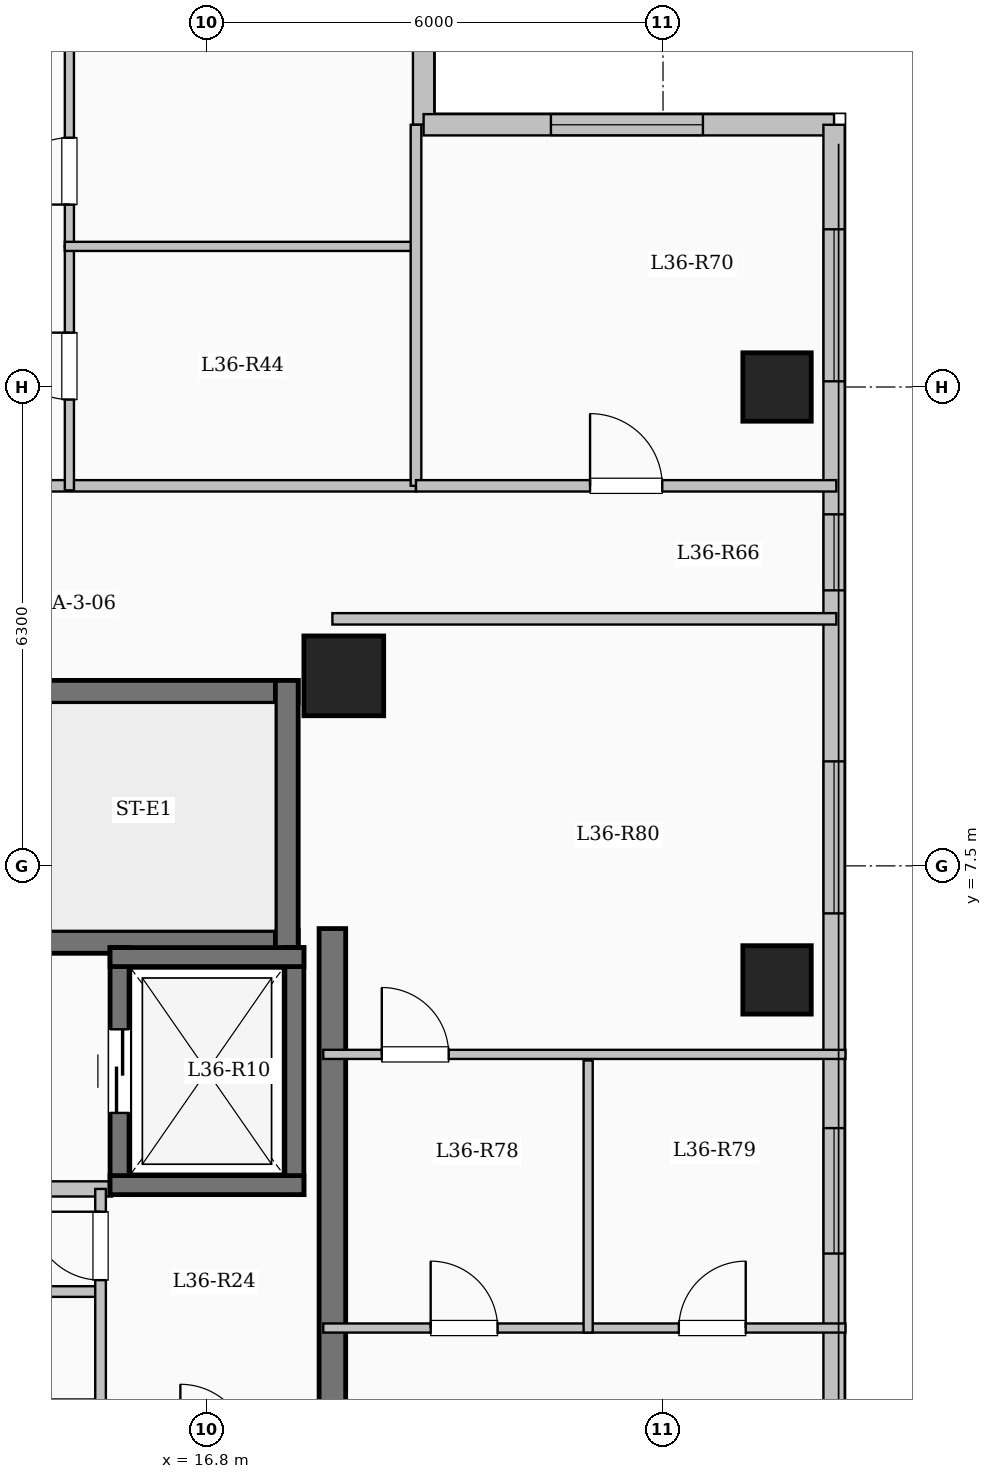
"""IFC4 building model, lengths in metres.
Left out: names, types, materials, properties, quantities, classifications, styles, units other than length and angle.
Written with IfcOpenShell. Run it as: python <this file> out.ifc"""

import sys

from ifc_helpers import new_model, si_unit, direction, frame, frame_2d, origin, origin_2d, place, context, subcontext, project, spatial, rectangle, extrude, element, fill, save


model = new_model("IFC4")
c1 = context("Model", 3, precision=1e-05, world=origin(), true_north=direction((0.0, 1.0)))
c2 = subcontext(c1, "Body", "Model", "MODEL_VIEW")
j1 = project(units=[si_unit("LENGTHUNIT", "METRE"), si_unit("PLANEANGLEUNIT", "RADIAN")], contexts=[c1])
p1 = place(None, origin())
s1 = spatial("IfcSite", under=j1, at=p1, CompositionType="ELEMENT")
p2 = place(p1, origin())
s2 = spatial("IfcBuilding", under=s1, at=p2, CompositionType="ELEMENT")
p3 = place(p2, frame((0.0, 0.0, 135.95)))
s3 = spatial("IfcBuildingStorey", under=s2, at=p3, CompositionType="ELEMENT", Elevation=135.95)
p4 = place(p3, frame((18.6, 10.0, 0.0), z_axis=(0.0, 0.0, 1.0), x_axis=(1.0, 0.0, 0.0)))
e1 = element("IfcColumn", 1, at=p4, inside=s3, PredefinedType="COLUMN", context=c2, shape_type="SweptSolid", body=[
    extrude(rectangle(XDim=1.05, YDim=1.05, at=origin_2d()), origin(), (0.0, 0.0, 1.0), 3.35),
])
for number, where, z_axis, x_axis in (
    (2, (24.3, 6.0, 0.0), (0.0, 0.0, 1.0), (1.0, 0.0, 0.0)),
    (3, (24.3, 13.8, 0.0), (0.0, 0.0, 1.0), (1.0, 0.0, 0.0)),
):
    element("IfcColumn", number, at=place(p3, frame(where, z_axis=z_axis, x_axis=x_axis)), inside=s3, PredefinedType="COLUMN", context=c2, shape_type="SweptSolid", body=[
        extrude(rectangle(XDim=0.9, YDim=0.9, at=origin_2d()), origin(), (0.0, 0.0, 1.0), 3.35),
    ])
p5 = place(p3, frame((19.65, 21.15, 0.0), z_axis=(0.0, 0.0, 1.0), x_axis=(0.0, -1.0, 0.0)))
e4 = element("IfcWall", 4, at=p5, inside=s3, PredefinedType="SOLIDWALL", context=c2, shape_type="SweptSolid", body=[
    extrude(rectangle(XDim=3.9, YDim=0.28, at=frame_2d((1.95, 0.0))), origin(), (0.0, 0.0, 1.0), 3.1),
])
p6 = place(p5, frame((1.143, 0.0, 0.9)))
e5 = element("IfcOpeningElement", 5, at=p6, cuts=e4, PredefinedType="OPENING", context=c2, shape_type="SweptSolid", body=[
    extrude(rectangle(XDim=1.65, YDim=1.6, at=frame_2d((0.825, 0.8))), frame((0.0, 0.15, 0.0), z_axis=(0.0, -1.0, 0.0), x_axis=(1.0, 0.0, 0.0)), (0.0, 0.0, 1.0), 0.3),
])
p7 = place(p3, frame((19.65, 17.25, 0.0), z_axis=(0.0, 0.0, 1.0), x_axis=(1.0, 0.0, 0.0)))
e6 = element("IfcWall", 6, at=p7, inside=s3, PredefinedType="SOLIDWALL", context=c2, shape_type="SweptSolid", body=[
    extrude(rectangle(XDim=5.4, YDim=0.28, at=frame_2d((2.7, 0.0))), origin(), (0.0, 0.0, 1.0), 3.1),
])
p8 = place(p7, frame((1.675, 0.0, 0.9)))
e7 = element("IfcOpeningElement", 7, at=p8, cuts=e6, PredefinedType="OPENING", context=c2, shape_type="SweptSolid", body=[
    extrude(rectangle(XDim=2.0, YDim=1.7, at=frame_2d((1.0, 0.85))), frame((0.0, 0.15, 0.0), z_axis=(0.0, -1.0, 0.0), x_axis=(1.0, 0.0, 0.0)), (0.0, 0.0, 1.0), 0.3),
])
p9 = place(p3, frame((25.05, 17.25, 0.0), z_axis=(0.0, 0.0, 1.0), x_axis=(0.0, -1.0, 0.0)))
e8 = element("IfcWall", 8, at=p9, inside=s3, PredefinedType="SOLIDWALL", context=c2, shape_type="SweptSolid", body=[
    extrude(rectangle(XDim=34.5, YDim=0.28, at=frame_2d((17.25, 0.0))), origin(), (0.0, 0.0, 1.0), 3.1),
])
p10 = place(p9, frame((1.375, 0.0, 0.9)))
e9 = element("IfcOpeningElement", 9, at=p10, cuts=e8, PredefinedType="OPENING", context=c2, shape_type="SweptSolid", body=[
    extrude(rectangle(XDim=2.0, YDim=1.7, at=frame_2d((1.0, 0.85))), frame((0.0, 0.15, 0.0), z_axis=(0.0, -1.0, 0.0), x_axis=(1.0, 0.0, 0.0)), (0.0, 0.0, 1.0), 0.3),
])
p11 = place(p9, frame((5.125, 0.0, 0.95)))
e10 = element("IfcOpeningElement", 10, at=p11, cuts=e8, PredefinedType="OPENING", context=c2, shape_type="SweptSolid", body=[
    extrude(rectangle(XDim=1.0, YDim=1.5, at=frame_2d((0.5, 0.75))), frame((0.0, 0.15, 0.0), z_axis=(0.0, -1.0, 0.0), x_axis=(1.0, 0.0, 0.0)), (0.0, 0.0, 1.0), 0.3),
])
p12 = place(p9, frame((8.375, 0.0, 0.9)))
e11 = element("IfcOpeningElement", 11, at=p12, cuts=e8, PredefinedType="OPENING", context=c2, shape_type="SweptSolid", body=[
    extrude(rectangle(XDim=2.0, YDim=1.7, at=frame_2d((1.0, 0.85))), frame((0.0, 0.15, 0.0), z_axis=(0.0, -1.0, 0.0), x_axis=(1.0, 0.0, 0.0)), (0.0, 0.0, 1.0), 0.3),
])
p13 = place(p9, frame((13.2, 0.0, 0.9)))
e12 = element("IfcOpeningElement", 12, at=p13, cuts=e8, PredefinedType="OPENING", context=c2, shape_type="SweptSolid", body=[
    extrude(rectangle(XDim=1.65, YDim=1.6, at=frame_2d((0.825, 0.8))), frame((0.0, 0.15, 0.0), z_axis=(0.0, -1.0, 0.0), x_axis=(1.0, 0.0, 0.0)), (0.0, 0.0, 1.0), 0.3),
])
p14 = place(p9, frame((19.05, 0.0, 0.9)))
e13 = element("IfcOpeningElement", 13, at=p14, cuts=e8, PredefinedType="OPENING", context=c2, shape_type="SweptSolid", body=[
    extrude(rectangle(XDim=2.2, YDim=1.75, at=frame_2d((1.1, 0.875))), frame((0.0, 0.15, 0.0), z_axis=(0.0, -1.0, 0.0), x_axis=(1.0, 0.0, 0.0)), (0.0, 0.0, 1.0), 0.3),
])
p15 = place(p9, frame((25.258, 0.0, 0.9)))
e14 = element("IfcOpeningElement", 14, at=p15, cuts=e8, PredefinedType="OPENING", context=c2, shape_type="SweptSolid", body=[
    extrude(rectangle(XDim=1.5, YDim=1.65, at=frame_2d((0.75, 0.825))), frame((0.0, 0.15, 0.0), z_axis=(0.0, -1.0, 0.0), x_axis=(1.0, 0.0, 0.0)), (0.0, 0.0, 1.0), 0.3),
])
p16 = place(p9, frame((29.95, 0.0, 0.9)))
e15 = element("IfcOpeningElement", 15, at=p16, cuts=e8, PredefinedType="OPENING", context=c2, shape_type="SweptSolid", body=[
    extrude(rectangle(XDim=2.2, YDim=1.75, at=frame_2d((1.1, 0.875))), frame((0.0, 0.15, 0.0), z_axis=(0.0, -1.0, 0.0), x_axis=(1.0, 0.0, 0.0)), (0.0, 0.0, 1.0), 0.3),
])
p17 = place(p3, frame((10.0, 9.79, 0.0), z_axis=(0.0, 0.0, 1.0), x_axis=(1.0, 0.0, 0.0)))
e16 = element("IfcWall", 16, at=p17, inside=s3, PredefinedType="SHEAR", context=c2, shape_type="SweptSolid", body=[
    extrude(rectangle(XDim=8.0, YDim=0.3, at=frame_2d((4.0, 0.0))), origin(), (0.0, 0.0, 1.0), 3.35),
])
p18 = place(p3, frame((10.0, 6.5, 0.0), z_axis=(0.0, 0.0, 1.0), x_axis=(1.0, 0.0, 0.0)))
e17 = element("IfcWall", 17, at=p18, inside=s3, PredefinedType="SHEAR", context=c2, shape_type="SweptSolid", body=[
    extrude(rectangle(XDim=8.0, YDim=0.3, at=frame_2d((4.0, 0.0))), origin(), (0.0, 0.0, 1.0), 3.35),
])
p19 = place(p18, frame((0.55, 0.0, 0.0)))
e18 = element("IfcOpeningElement", 18, at=p19, cuts=e17, PredefinedType="OPENING", context=c2, shape_type="SweptSolid", body=[
    extrude(rectangle(XDim=1.0, YDim=2.15, at=frame_2d((0.5, 1.075))), frame((0.0, 0.16, 0.0), z_axis=(0.0, -1.0, 0.0), x_axis=(1.0, 0.0, 0.0)), (0.0, 0.0, 1.0), 0.32),
])
p20 = place(p3, frame((17.85, 6.35, 0.0), z_axis=(0.0, 0.0, 1.0), x_axis=(0.0, 1.0, 0.0)))
e19 = element("IfcWall", 19, at=p20, inside=s3, PredefinedType="SHEAR", context=c2, shape_type="SweptSolid", body=[
    extrude(rectangle(XDim=3.59, YDim=0.3, at=frame_2d((1.795, 0.0))), origin(), (0.0, 0.0, 1.0), 3.35),
])
p21 = place(p3, frame((10.15, 3.25, 0.0), z_axis=(0.0, 0.0, 1.0), x_axis=(1.0, 0.0, 0.0)))
e20 = element("IfcWall", 20, at=p21, inside=s3, PredefinedType="SOLIDWALL", context=c2, shape_type="SweptSolid", body=[
    extrude(rectangle(XDim=5.4, YDim=0.2, at=frame_2d((2.7, 0.0))), origin(), (0.0, 0.0, 1.0), 3.1),
])
p22 = place(p3, frame((15.65, 3.175, 0.0), z_axis=(0.0, 0.0, 1.0), x_axis=(0.0, 1.0, 0.0)))
e21 = element("IfcWall", 21, at=p22, inside=s3, PredefinedType="SHEAR", context=c2, shape_type="SweptSolid", body=[
    extrude(rectangle(XDim=3.25, YDim=0.25, at=frame_2d((1.625, 0.0))), origin(), (0.0, 0.0, 1.0), 3.35),
])
p23 = place(p22, frame((1.075, 0.0, 0.0)))
e22 = element("IfcOpeningElement", 22, at=p23, cuts=e21, PredefinedType="OPENING", context=c2, shape_type="SweptSolid", body=[
    extrude(rectangle(XDim=1.1, YDim=2.15, at=frame_2d((0.55, 1.075))), frame((0.0, 0.135, 0.0), z_axis=(0.0, -1.0, 0.0), x_axis=(1.0, 0.0, 0.0)), (0.0, 0.0, 1.0), 0.27),
])
p24 = place(p3, frame((17.95, 3.175, 0.0), z_axis=(0.0, 0.0, 1.0), x_axis=(0.0, 1.0, 0.0)))
e23 = element("IfcWall", 23, at=p24, inside=s3, PredefinedType="SHEAR", context=c2, shape_type="SweptSolid", body=[
    extrude(rectangle(XDim=3.25, YDim=0.25, at=frame_2d((1.625, 0.0))), origin(), (0.0, 0.0, 1.0), 3.35),
])
for number, where, z_axis, x_axis in (
    (24, (15.525, 3.3, 0.0), (0.0, 0.0, 1.0), (1.0, 0.0, 0.0)),
    (25, (15.525, 6.3, 0.0), (0.0, 0.0, 1.0), (1.0, 0.0, 0.0)),
):
    element("IfcWall", number, at=place(p3, frame(where, z_axis=z_axis, x_axis=x_axis)), inside=s3, PredefinedType="SHEAR", context=c2, shape_type="SweptSolid", body=[
        extrude(rectangle(XDim=2.55, YDim=0.25, at=frame_2d((1.275, 0.0))), origin(), (0.0, 0.0, 1.0), 3.35),
    ])
p25 = place(p3, frame((18.45, -7.375, 0.0), z_axis=(0.0, 0.0, 1.0), x_axis=(0.0, 1.0, 0.0)))
e26 = element("IfcWall", 26, at=p25, inside=s3, PredefinedType="SHEAR", context=c2, shape_type="SweptSolid", body=[
    extrude(rectangle(XDim=14.05, YDim=0.35, at=frame_2d((7.025, 0.0))), origin(), (0.0, 0.0, 1.0), 3.35),
])
p26 = place(p3, frame((12.55, 1.9, 0.0), z_axis=(0.0, 0.0, 1.0), x_axis=(1.0, 0.0, 0.0)))
e27 = element("IfcWall", 27, at=p26, inside=s3, PredefinedType="PARTITIONING", context=c2, shape_type="SweptSolid", body=[
    extrude(rectangle(XDim=2.85, YDim=0.14, at=frame_2d((1.425, 0.0))), origin(), (0.0, 0.0, 1.0), 3.1),
])
p27 = place(p3, frame((15.4, -7.2, 0.0), z_axis=(0.0, 0.0, 1.0), x_axis=(0.0, 1.0, 0.0)))
e28 = element("IfcWall", 28, at=p27, inside=s3, PredefinedType="PARTITIONING", context=c2, shape_type="SweptSolid", body=[
    extrude(rectangle(XDim=10.45, YDim=0.14, at=frame_2d((5.225, 0.0))), origin(), (0.0, 0.0, 1.0), 3.1),
])
p28 = place(p27, frame((9.25, 0.0, 0.0)))
e29 = element("IfcOpeningElement", 29, at=p28, cuts=e28, PredefinedType="OPENING", context=c2, shape_type="SweptSolid", body=[
    extrude(rectangle(XDim=0.9, YDim=2.08, at=frame_2d((0.45, 1.04))), frame((0.0, 0.08, 0.0), z_axis=(0.0, -1.0, 0.0), x_axis=(1.0, 0.0, 0.0)), (0.0, 0.0, 1.0), 0.16),
])
p29 = place(p3, frame((3.85, 12.5, 0.0), z_axis=(0.0, 0.0, 1.0), x_axis=(1.0, 0.0, 0.0)))
e30 = element("IfcWall", 30, at=p29, inside=s3, PredefinedType="PARTITIONING", context=c2, shape_type="SweptSolid", body=[
    extrude(rectangle(XDim=15.7, YDim=0.15, at=frame_2d((7.85, 0.0))), origin(), (0.0, 0.0, 1.0), 3.1),
])
p30 = place(p29, frame((0.55, 0.0, 0.0)))
e31 = element("IfcOpeningElement", 31, at=p30, cuts=e30, PredefinedType="OPENING", context=c2, shape_type="SweptSolid", body=[
    extrude(rectangle(XDim=0.96, YDim=2.15, at=frame_2d((0.48, 1.075))), frame((0.0, 0.085, 0.0), z_axis=(0.0, -1.0, 0.0), x_axis=(1.0, 0.0, 0.0)), (0.0, 0.0, 1.0), 0.17),
])
p31 = place(p29, frame((7.28, 0.0, 0.0)))
e32 = element("IfcOpeningElement", 32, at=p31, cuts=e30, PredefinedType="OPENING", context=c2, shape_type="SweptSolid", body=[
    extrude(rectangle(XDim=0.96, YDim=2.15, at=frame_2d((0.48, 1.075))), frame((0.0, 0.085, 0.0), z_axis=(0.0, -1.0, 0.0), x_axis=(1.0, 0.0, 0.0)), (0.0, 0.0, 1.0), 0.17),
])
p32 = place(p3, frame((14.99, 12.44, 0.0), z_axis=(0.0, 0.0, 1.0), x_axis=(0.0, 1.0, 0.0)))
e33 = element("IfcWall", 33, at=p32, inside=s3, PredefinedType="PARTITIONING", context=c2, shape_type="SweptSolid", body=[
    extrude(rectangle(XDim=3.21, YDim=0.12, at=frame_2d((1.605, 0.0))), origin(), (0.0, 0.0, 1.0), 2.585),
])
p33 = place(p32, frame((1.195, 0.0, 0.0)))
e34 = element("IfcOpeningElement", 34, at=p33, cuts=e33, PredefinedType="OPENING", context=c2, shape_type="SweptSolid", body=[
    extrude(rectangle(XDim=0.88, YDim=2.1, at=frame_2d((0.44, 1.05))), frame((0.0, 0.07, 0.0), z_axis=(0.0, -1.0, 0.0), x_axis=(1.0, 0.0, 0.0)), (0.0, 0.0, 1.0), 0.14),
])
p34 = place(p3, frame((14.99, 15.65, 0.0), z_axis=(0.0, 0.0, 1.0), x_axis=(0.0, 1.0, 0.0)))
e35 = element("IfcWall", 35, at=p34, inside=s3, PredefinedType="PARTITIONING", context=c2, shape_type="SweptSolid", body=[
    extrude(rectangle(XDim=5.55, YDim=0.12, at=frame_2d((2.775, 0.0))), origin(), (0.0, 0.0, 1.0), 2.585),
])
p35 = place(p34, frame((0.55, 0.0, 0.0)))
e36 = element("IfcOpeningElement", 36, at=p35, cuts=e35, PredefinedType="OPENING", context=c2, shape_type="SweptSolid", body=[
    extrude(rectangle(XDim=0.88, YDim=2.1, at=frame_2d((0.44, 1.05))), frame((0.0, 0.07, 0.0), z_axis=(0.0, -1.0, 0.0), x_axis=(1.0, 0.0, 0.0)), (0.0, 0.0, 1.0), 0.14),
])
p36 = place(p3, frame((14.93, 15.65, 0.0), z_axis=(0.0, 0.0, 1.0), x_axis=(1.0, 0.0, 0.0)))
e37 = element("IfcWall", 37, at=p36, inside=s3, PredefinedType="PARTITIONING", context=c2, shape_type="SweptSolid", body=[
    extrude(rectangle(XDim=4.68, YDim=0.12, at=frame_2d((2.34, 0.0))), origin(), (0.0, 0.0, 1.0), 3.1),
])
p37 = place(p3, frame((18.45, 10.75, 0.0), z_axis=(0.0, 0.0, 1.0), x_axis=(1.0, 0.0, 0.0)))
e38 = element("IfcWall", 38, at=p37, inside=s3, PredefinedType="PARTITIONING", context=c2, shape_type="SweptSolid", body=[
    extrude(rectangle(XDim=6.63, YDim=0.15, at=frame_2d((3.315, 0.0))), origin(), (0.0, 0.0, 1.0), 3.1),
])
p38 = place(p3, frame((19.55, 12.5, 0.0), z_axis=(0.0, 0.0, 1.0), x_axis=(0.0, 1.0, 0.0)))
e39 = element("IfcWall", 39, at=p38, inside=s3, PredefinedType="PARTITIONING", context=c2, shape_type="SweptSolid", body=[
    extrude(rectangle(XDim=4.75, YDim=0.14, at=frame_2d((2.375, 0.0))), origin(), (0.0, 0.0, 1.0), 3.1),
])
p39 = place(p3, frame((19.55, 12.5, 0.0), z_axis=(0.0, 0.0, 1.0), x_axis=(1.0, 0.0, 0.0)))
e40 = element("IfcWall", 40, at=p39, inside=s3, PredefinedType="PARTITIONING", context=c2, shape_type="SweptSolid", body=[
    extrude(rectangle(XDim=5.53, YDim=0.15, at=frame_2d((2.765, 0.0))), origin(), (0.0, 0.0, 1.0), 3.1),
])
p40 = place(p39, frame((2.29, 0.0, 0.0)))
e41 = element("IfcOpeningElement", 41, at=p40, cuts=e40, PredefinedType="OPENING", context=c2, shape_type="SweptSolid", body=[
    extrude(rectangle(XDim=0.95, YDim=2.15, at=frame_2d((0.475, 1.075))), frame((0.0, 0.085, 0.0), z_axis=(0.0, -1.0, 0.0), x_axis=(1.0, 0.0, 0.0)), (0.0, 0.0, 1.0), 0.17),
])
p41 = place(p3, frame((18.33, 1.42, 0.0), z_axis=(0.0, 0.0, 1.0), x_axis=(1.0, 0.0, 0.0)))
e42 = element("IfcWall", 42, at=p41, inside=s3, PredefinedType="PARTITIONING", context=c2, shape_type="SweptSolid", body=[
    extrude(rectangle(XDim=6.87, YDim=0.12, at=frame_2d((3.435, 0.0))), origin(), (0.0, 0.0, 1.0), 3.1),
])
p42 = place(p41, frame((1.413, 0.0, 0.0)))
e43 = element("IfcOpeningElement", 43, at=p42, cuts=e42, PredefinedType="OPENING", context=c2, shape_type="SweptSolid", body=[
    extrude(rectangle(XDim=0.88, YDim=2.1, at=frame_2d((0.44, 1.05))), frame((0.0, 0.07, 0.0), z_axis=(0.0, -1.0, 0.0), x_axis=(1.0, 0.0, 0.0)), (0.0, 0.0, 1.0), 0.14),
])
p43 = place(p41, frame((4.678, 0.0, 0.0)))
e44 = element("IfcOpeningElement", 44, at=p43, cuts=e42, PredefinedType="OPENING", context=c2, shape_type="SweptSolid", body=[
    extrude(rectangle(XDim=0.88, YDim=2.1, at=frame_2d((0.44, 1.05))), frame((0.0, 0.07, 0.0), z_axis=(0.0, -1.0, 0.0), x_axis=(1.0, 0.0, 0.0)), (0.0, 0.0, 1.0), 0.14),
])
p44 = place(p3, frame((18.33, 5.02, 0.0), z_axis=(0.0, 0.0, 1.0), x_axis=(1.0, 0.0, 0.0)))
e45 = element("IfcWall", 45, at=p44, inside=s3, PredefinedType="PARTITIONING", context=c2, shape_type="SweptSolid", body=[
    extrude(rectangle(XDim=6.87, YDim=0.12, at=frame_2d((3.435, 0.0))), origin(), (0.0, 0.0, 1.0), 3.1),
])
p45 = place(p44, frame((0.77, 0.0, 0.0)))
e46 = element("IfcOpeningElement", 46, at=p45, cuts=e45, PredefinedType="OPENING", context=c2, shape_type="SweptSolid", body=[
    extrude(rectangle(XDim=0.88, YDim=2.1, at=frame_2d((0.44, 1.05))), frame((0.0, 0.07, 0.0), z_axis=(0.0, -1.0, 0.0), x_axis=(1.0, 0.0, 0.0)), (0.0, 0.0, 1.0), 0.14),
])
p46 = place(p3, frame((21.815, 1.36, 0.0), z_axis=(0.0, 0.0, 1.0), x_axis=(0.0, 1.0, 0.0)))
e47 = element("IfcWall", 47, at=p46, inside=s3, PredefinedType="PARTITIONING", context=c2, shape_type="SweptSolid", body=[
    extrude(rectangle(XDim=3.58, YDim=0.12, at=frame_2d((1.79, 0.0))), origin(), (0.0, 0.0, 1.0), 3.1),
])
p47 = place(p8, origin())
e48 = element("IfcWindow", 48, at=p47, inside=s3, PartitioningType="SINGLE_PANEL", PredefinedType="WINDOW", context=c2, shape_type="SweptSolid", body=[
    extrude(rectangle(XDim=2.0, YDim=1.7, at=frame_2d((1.0, 0.85))), frame((0.0, 0.03, 0.0), z_axis=(0.0, -1.0, 0.0), x_axis=(1.0, 0.0, 0.0)), (0.0, 0.0, 1.0), 0.06),
])
fill(e7, e48)
p48 = place(p10, origin())
e49 = element("IfcWindow", 49, at=p48, inside=s3, PartitioningType="SINGLE_PANEL", PredefinedType="WINDOW", context=c2, shape_type="SweptSolid", body=[
    extrude(rectangle(XDim=2.0, YDim=1.7, at=frame_2d((1.0, 0.85))), frame((0.0, 0.03, 0.0), z_axis=(0.0, -1.0, 0.0), x_axis=(1.0, 0.0, 0.0)), (0.0, 0.0, 1.0), 0.06),
])
fill(e9, e49)
p49 = place(p11, origin())
e50 = element("IfcWindow", 50, at=p49, inside=s3, PartitioningType="SINGLE_PANEL", PredefinedType="WINDOW", context=c2, shape_type="SweptSolid", body=[
    extrude(rectangle(XDim=1.0, YDim=1.5, at=frame_2d((0.5, 0.75))), frame((0.0, 0.03, 0.0), z_axis=(0.0, -1.0, 0.0), x_axis=(1.0, 0.0, 0.0)), (0.0, 0.0, 1.0), 0.06),
])
fill(e10, e50)
p50 = place(p12, origin())
e51 = element("IfcWindow", 51, at=p50, inside=s3, PartitioningType="SINGLE_PANEL", PredefinedType="WINDOW", context=c2, shape_type="SweptSolid", body=[
    extrude(rectangle(XDim=2.0, YDim=1.7, at=frame_2d((1.0, 0.85))), frame((0.0, 0.03, 0.0), z_axis=(0.0, -1.0, 0.0), x_axis=(1.0, 0.0, 0.0)), (0.0, 0.0, 1.0), 0.06),
])
fill(e11, e51)
p51 = place(p13, origin())
e52 = element("IfcWindow", 52, at=p51, inside=s3, PartitioningType="SINGLE_PANEL", PredefinedType="WINDOW", context=c2, shape_type="SweptSolid", body=[
    extrude(rectangle(XDim=1.65, YDim=1.6, at=frame_2d((0.825, 0.8))), frame((0.0, 0.03, 0.0), z_axis=(0.0, -1.0, 0.0), x_axis=(1.0, 0.0, 0.0)), (0.0, 0.0, 1.0), 0.06),
])
fill(e12, e52)
p52 = place(p23, origin())
e53 = element("IfcDoor", 53, at=p52, inside=s3, OperationType="SLIDING_TO_LEFT", PredefinedType="DOOR", context=c2, shape_type="SweptSolid", body=[
    extrude(rectangle(XDim=1.1, YDim=2.15, at=frame_2d((0.55, 1.075))), frame((0.0, 0.025, 0.0), z_axis=(0.0, -1.0, 0.0), x_axis=(1.0, 0.0, 0.0)), (0.0, 0.0, 1.0), 0.05),
])
fill(e22, e53)
p53 = place(p28, origin())
e54 = element("IfcDoor", 54, at=p53, inside=s3, OperationType="SINGLE_SWING_RIGHT", PredefinedType="DOOR", context=c2, shape_type="SweptSolid", body=[
    extrude(rectangle(XDim=0.9, YDim=2.08, at=frame_2d((0.45, 1.04))), frame((0.0, 0.025, 0.0), z_axis=(0.0, -1.0, 0.0), x_axis=(1.0, 0.0, 0.0)), (0.0, 0.0, 1.0), 0.05),
])
fill(e29, e54)
p54 = place(p33, origin())
e55 = element("IfcDoor", 55, at=p54, inside=s3, OperationType="SINGLE_SWING_RIGHT", PredefinedType="DOOR", context=c2, shape_type="SweptSolid", body=[
    extrude(rectangle(XDim=0.88, YDim=2.1, at=frame_2d((0.44, 1.05))), frame((0.0, 0.025, 0.0), z_axis=(0.0, -1.0, 0.0), x_axis=(1.0, 0.0, 0.0)), (0.0, 0.0, 1.0), 0.05),
])
fill(e34, e55)
p55 = place(p35, origin())
e56 = element("IfcDoor", 56, at=p55, inside=s3, OperationType="SINGLE_SWING_LEFT", PredefinedType="DOOR", context=c2, shape_type="SweptSolid", body=[
    extrude(rectangle(XDim=0.88, YDim=2.1, at=frame_2d((0.44, 1.05))), frame((0.0, 0.025, 0.0), z_axis=(0.0, -1.0, 0.0), x_axis=(1.0, 0.0, 0.0)), (0.0, 0.0, 1.0), 0.05),
])
fill(e36, e56)
p56 = place(p40, origin())
e57 = element("IfcDoor", 57, at=p56, inside=s3, OperationType="SINGLE_SWING_LEFT", PredefinedType="DOOR", context=c2, shape_type="SweptSolid", body=[
    extrude(rectangle(XDim=0.95, YDim=2.15, at=frame_2d((0.475, 1.075))), frame((0.0, 0.025, 0.0), z_axis=(0.0, -1.0, 0.0), x_axis=(1.0, 0.0, 0.0)), (0.0, 0.0, 1.0), 0.05),
])
fill(e41, e57)
p57 = place(p42, origin())
e58 = element("IfcDoor", 58, at=p57, inside=s3, OperationType="SINGLE_SWING_LEFT", PredefinedType="DOOR", context=c2, shape_type="SweptSolid", body=[
    extrude(rectangle(XDim=0.88, YDim=2.1, at=frame_2d((0.44, 1.05))), frame((0.0, 0.025, 0.0), z_axis=(0.0, -1.0, 0.0), x_axis=(1.0, 0.0, 0.0)), (0.0, 0.0, 1.0), 0.05),
])
fill(e43, e58)
p58 = place(p43, origin())
e59 = element("IfcDoor", 59, at=p58, inside=s3, OperationType="SINGLE_SWING_RIGHT", PredefinedType="DOOR", context=c2, shape_type="SweptSolid", body=[
    extrude(rectangle(XDim=0.88, YDim=2.1, at=frame_2d((0.44, 1.05))), frame((0.0, 0.025, 0.0), z_axis=(0.0, -1.0, 0.0), x_axis=(1.0, 0.0, 0.0)), (0.0, 0.0, 1.0), 0.05),
])
fill(e44, e59)
p59 = place(p45, origin())
e60 = element("IfcDoor", 60, at=p59, inside=s3, OperationType="SINGLE_SWING_LEFT", PredefinedType="DOOR", context=c2, shape_type="SweptSolid", body=[
    extrude(rectangle(XDim=0.88, YDim=2.1, at=frame_2d((0.44, 1.05))), frame((0.0, 0.025, 0.0), z_axis=(0.0, -1.0, 0.0), x_axis=(1.0, 0.0, 0.0)), (0.0, 0.0, 1.0), 0.05),
])
fill(e46, e60)
save(model, sys.argv[1])
